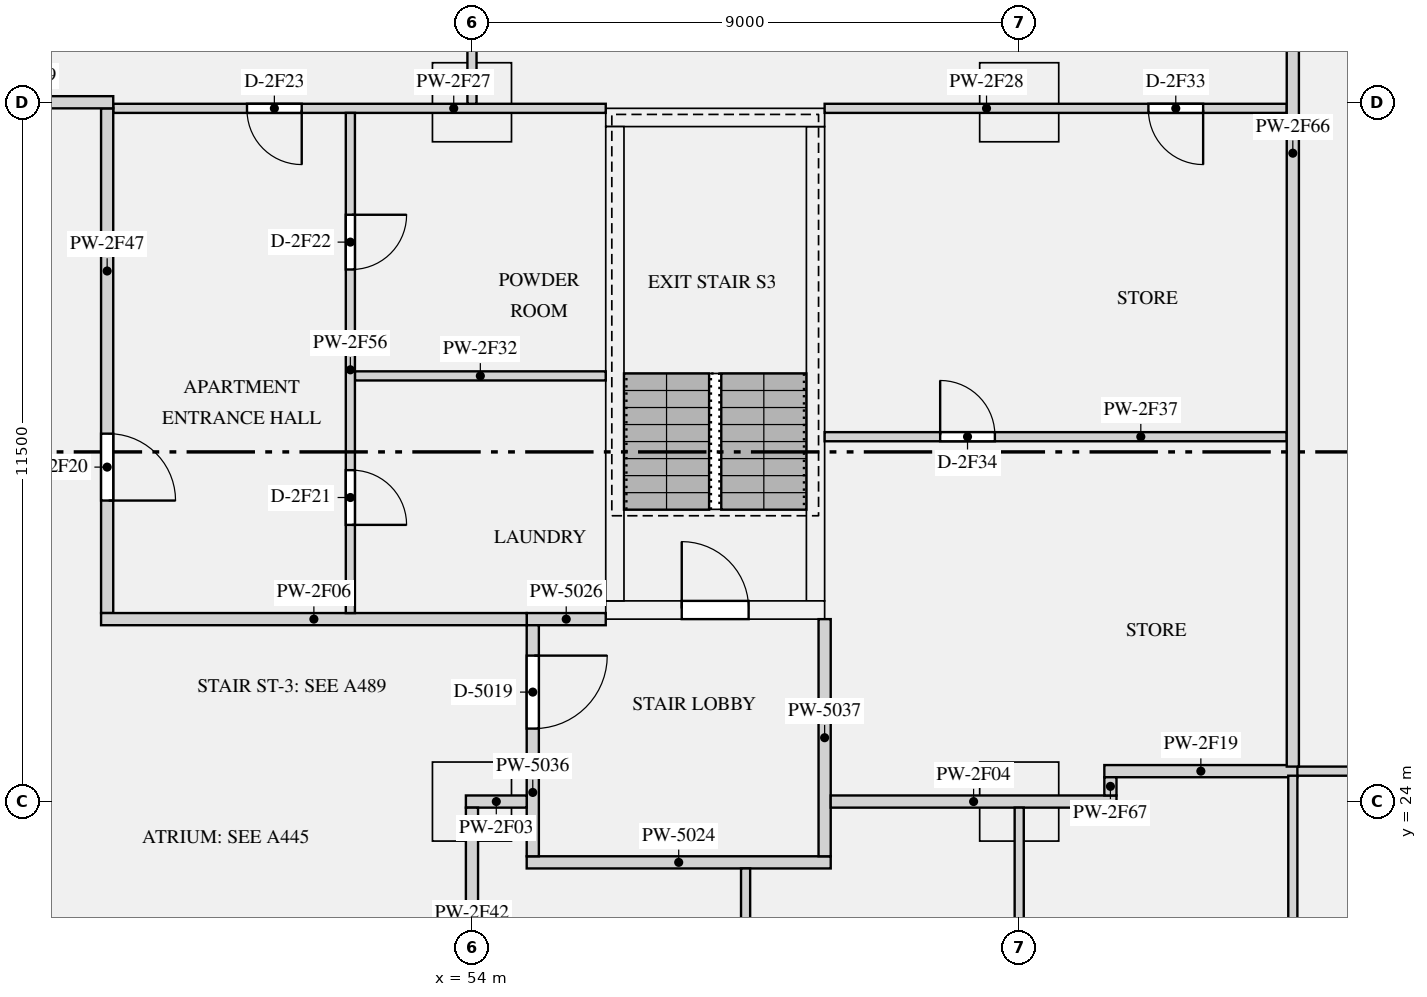
"""IFC4 building model, lengths in metres.
Left out: names, types, materials, properties, quantities, classifications, styles, units other than length and angle.
Written with IfcOpenShell. Run it as: python <this file> out.ifc"""

import sys

from ifc_helpers import new_model, si_unit, direction, frame, frame_2d, origin, origin_2d, place, context, subcontext, project, spatial, rectangle, extrude, element, fill, save


model = new_model("IFC4")
c1 = context("Model", 3, precision=1e-05, world=origin(), true_north=direction((0.0, 1.0)))
c2 = subcontext(c1, "Body", "Model", "MODEL_VIEW")
j1 = project(units=[si_unit("LENGTHUNIT", "METRE"), si_unit("PLANEANGLEUNIT", "RADIAN")], contexts=[c1])
p1 = place(None, origin())
s1 = spatial("IfcSite", under=j1, at=p1, CompositionType="ELEMENT")
p2 = place(p1, origin())
s2 = spatial("IfcBuilding", under=s1, at=p2, CompositionType="ELEMENT")
p3 = place(p2, frame((0.0, 0.0, 124.5)))
s3 = spatial("IfcBuildingStorey", under=s2, at=p3, CompositionType="ELEMENT", Elevation=124.5)
for number, where, z_axis, x_axis in (
    (1, (54.0, 24.0, 0.0), (0.0, 0.0, 1.0), (1.0, 0.0, 0.0)),
    (2, (63.0, 24.0, 0.0), (0.0, 0.0, 1.0), (1.0, 0.0, 0.0)),
    (3, (54.0, 35.5, 0.0), (0.0, 0.0, 1.0), (1.0, 0.0, 0.0)),
    (4, (63.0, 35.5, 0.0), (0.0, 0.0, 1.0), (1.0, 0.0, 0.0)),
):
    element("IfcColumn", number, at=place(p3, frame(where, z_axis=z_axis, x_axis=x_axis)), inside=s3, PredefinedType="COLUMN", context=c2, shape_type="SweptSolid", body=[
        extrude(rectangle(XDim=1.3, YDim=1.3, at=origin_2d()), origin(), (0.0, 0.0, 1.0), 3.15),
    ])
p4 = place(p3, frame((56.2, 27.15, 0.0), z_axis=(0.0, 0.0, 1.0), x_axis=(1.0, 0.0, 0.0)))
e5 = element("IfcWall", 5, at=p4, inside=s3, PredefinedType="SHEAR", context=c2, shape_type="SweptSolid", body=[
    extrude(rectangle(XDim=3.6, YDim=0.3, at=frame_2d((1.8, 0.0))), origin(), (0.0, 0.0, 1.0), 3.15),
])
p5 = place(p4, frame((1.25, 0.0, 0.0)))
e6 = element("IfcOpeningElement", 6, at=p5, cuts=e5, PredefinedType="OPENING", context=c2, shape_type="SweptSolid", body=[
    extrude(rectangle(XDim=1.1, YDim=2.1, at=frame_2d((0.55, 1.05))), frame((0.0, 0.16, 0.0), z_axis=(0.0, -1.0, 0.0), x_axis=(1.0, 0.0, 0.0)), (0.0, 0.0, 1.0), 0.32),
])
p6 = place(p3, frame((56.2, 35.25, 0.0), z_axis=(0.0, 0.0, 1.0), x_axis=(1.0, 0.0, 0.0)))
e7 = element("IfcWall", 7, at=p6, inside=s3, PredefinedType="SHEAR", context=c2, shape_type="SweptSolid", body=[
    extrude(rectangle(XDim=3.6, YDim=0.3, at=frame_2d((1.8, 0.0))), origin(), (0.0, 0.0, 1.0), 3.15),
])
for number, where, z_axis, x_axis in (
    (8, (56.35, 27.3, 0.0), (0.0, 0.0, 1.0), (0.0, 1.0, 0.0)),
    (9, (59.65, 27.3, 0.0), (0.0, 0.0, 1.0), (0.0, 1.0, 0.0)),
):
    element("IfcWall", number, at=place(p3, frame(where, z_axis=z_axis, x_axis=x_axis)), inside=s3, PredefinedType="SHEAR", context=c2, shape_type="SweptSolid", body=[
        extrude(rectangle(XDim=7.8, YDim=0.3, at=frame_2d((3.9, 0.0))), origin(), (0.0, 0.0, 1.0), 3.15),
    ])
p7 = place(p3, frame((54.9, 23.0, 0.0), z_axis=(0.0, 0.0, 1.0), x_axis=(1.0, 0.0, 0.0)))
e10 = element("IfcWall", 10, at=p7, inside=s3, PredefinedType="PARTITIONING", context=c2, shape_type="SweptSolid", body=[
    extrude(rectangle(XDim=5.0, YDim=0.2, at=frame_2d((2.5, 0.0))), origin(), (0.0, 0.0, 1.0), 2.83),
])
p8 = place(p3, frame((54.9, 27.0, 0.0), z_axis=(0.0, 0.0, 1.0), x_axis=(1.0, 0.0, 0.0)))
e11 = element("IfcWall", 11, at=p8, inside=s3, PredefinedType="PARTITIONING", context=c2, shape_type="SweptSolid", body=[
    extrude(rectangle(XDim=1.3, YDim=0.2, at=frame_2d((0.65, 0.0))), origin(), (0.0, 0.0, 1.0), 2.83),
])
p9 = place(p3, frame((55.0, 23.1, 0.0), z_axis=(0.0, 0.0, 1.0), x_axis=(0.0, 1.0, 0.0)))
e12 = element("IfcWall", 12, at=p9, inside=s3, PredefinedType="PARTITIONING", context=c2, shape_type="SweptSolid", body=[
    extrude(rectangle(XDim=3.8, YDim=0.2, at=frame_2d((1.9, 0.0))), origin(), (0.0, 0.0, 1.0), 2.83),
])
p10 = place(p9, frame((2.1, 0.0, 0.0)))
e13 = element("IfcOpeningElement", 13, at=p10, cuts=e12, PredefinedType="OPENING", context=c2, shape_type="SweptSolid", body=[
    extrude(rectangle(XDim=1.2, YDim=2.1, at=frame_2d((0.6, 1.05))), frame((0.0, 0.11, 0.0), z_axis=(0.0, -1.0, 0.0), x_axis=(1.0, 0.0, 0.0)), (0.0, 0.0, 1.0), 0.22),
])
p11 = place(p3, frame((59.8, 23.1, 0.0), z_axis=(0.0, 0.0, 1.0), x_axis=(0.0, 1.0, 0.0)))
e14 = element("IfcWall", 14, at=p11, inside=s3, PredefinedType="PARTITIONING", context=c2, shape_type="SweptSolid", body=[
    extrude(rectangle(XDim=3.9, YDim=0.2, at=frame_2d((1.95, 0.0))), origin(), (0.0, 0.0, 1.0), 2.83),
])
p12 = place(p3, frame((53.9, 24.0, 0.0), z_axis=(0.0, 0.0, 1.0), x_axis=(1.0, 0.0, 0.0)))
e15 = element("IfcWall", 15, at=p12, inside=s3, PredefinedType="PARTITIONING", context=c2, shape_type="SweptSolid", body=[
    extrude(rectangle(XDim=1.0, YDim=0.2, at=frame_2d((0.5, 0.0))), origin(), (0.0, 0.0, 1.0), 2.83),
])
p13 = place(p3, frame((59.9, 24.0, 0.0), z_axis=(0.0, 0.0, 1.0), x_axis=(1.0, 0.0, 0.0)))
e16 = element("IfcWall", 16, at=p13, inside=s3, PredefinedType="PARTITIONING", context=c2, shape_type="SweptSolid", body=[
    extrude(rectangle(XDim=4.7, YDim=0.2, at=frame_2d((2.35, 0.0))), origin(), (0.0, 0.0, 1.0), 2.83),
])
p14 = place(p3, frame((47.9, 27.0, 0.0), z_axis=(0.0, 0.0, 1.0), x_axis=(1.0, 0.0, 0.0)))
e17 = element("IfcWall", 17, at=p14, inside=s3, PredefinedType="PARTITIONING", context=c2, shape_type="SweptSolid", body=[
    extrude(rectangle(XDim=7.0, YDim=0.2, at=frame_2d((3.5, 0.0))), origin(), (0.0, 0.0, 1.0), 2.83),
])
p15 = place(p3, frame((45.0, 35.5, 0.0), z_axis=(0.0, 0.0, 1.0), x_axis=(1.0, 0.0, 0.0)))
e18 = element("IfcWall", 18, at=p15, inside=s3, PredefinedType="PARTITIONING", context=c2, shape_type="SweptSolid", body=[
    extrude(rectangle(XDim=3.1, YDim=0.2, at=frame_2d((1.55, 0.0))), origin(), (0.0, 0.0, 1.0), 2.83),
])
p16 = place(p3, frame((67.425, 24.5, 0.0), z_axis=(0.0, 0.0, 1.0), x_axis=(1.0, 0.0, 0.0)))
e19 = element("IfcWall", 19, at=p16, inside=s3, PredefinedType="PARTITIONING", context=c2, shape_type="SweptSolid", body=[
    extrude(rectangle(XDim=4.65, YDim=0.15, at=frame_2d((2.325, 0.0))), origin(), (0.0, 0.0, 1.0), 2.83),
])
p17 = place(p16, frame((1.25, 0.0, 0.0)))
e20 = element("IfcOpeningElement", 20, at=p17, cuts=e19, PredefinedType="OPENING", context=c2, shape_type="SweptSolid", body=[
    extrude(rectangle(XDim=1.5, YDim=2.1, at=frame_2d((0.75, 1.05))), frame((0.0, 0.085, 0.0), z_axis=(0.0, -1.0, 0.0), x_axis=(1.0, 0.0, 0.0)), (0.0, 0.0, 1.0), 0.17),
])
p18 = place(p3, frame((64.4, 24.5, 0.0), z_axis=(0.0, 0.0, 1.0), x_axis=(1.0, 0.0, 0.0)))
e21 = element("IfcWall", 21, at=p18, inside=s3, PredefinedType="PARTITIONING", context=c2, shape_type="SweptSolid", body=[
    extrude(rectangle(XDim=3.175, YDim=0.2, at=frame_2d((1.587, 0.0))), origin(), (0.0, 0.0, 1.0), 2.83),
])
p19 = place(p3, frame((48.1, 35.4, 0.0), z_axis=(0.0, 0.0, 1.0), x_axis=(1.0, 0.0, 0.0)))
e22 = element("IfcWall", 22, at=p19, inside=s3, PredefinedType="PARTITIONING", context=c2, shape_type="SweptSolid", body=[
    extrude(rectangle(XDim=8.1, YDim=0.15, at=frame_2d((4.05, 0.0))), origin(), (0.0, 0.0, 1.0), 2.83),
])
p20 = place(p19, frame((2.2, 0.0, 0.0)))
e23 = element("IfcOpeningElement", 23, at=p20, cuts=e22, PredefinedType="OPENING", context=c2, shape_type="SweptSolid", body=[
    extrude(rectangle(XDim=0.9, YDim=2.1, at=frame_2d((0.45, 1.05))), frame((0.0, 0.085, 0.0), z_axis=(0.0, -1.0, 0.0), x_axis=(1.0, 0.0, 0.0)), (0.0, 0.0, 1.0), 0.17),
])
p21 = place(p3, frame((59.8, 35.4, 0.0), z_axis=(0.0, 0.0, 1.0), x_axis=(1.0, 0.0, 0.0)))
e24 = element("IfcWall", 24, at=p21, inside=s3, PredefinedType="PARTITIONING", context=c2, shape_type="SweptSolid", body=[
    extrude(rectangle(XDim=7.6, YDim=0.15, at=frame_2d((3.8, 0.0))), origin(), (0.0, 0.0, 1.0), 2.83),
])
p22 = place(p21, frame((5.325, 0.0, 0.0)))
e25 = element("IfcOpeningElement", 25, at=p22, cuts=e24, PredefinedType="OPENING", context=c2, shape_type="SweptSolid", body=[
    extrude(rectangle(XDim=0.9, YDim=2.1, at=frame_2d((0.45, 1.05))), frame((0.0, 0.085, 0.0), z_axis=(0.0, -1.0, 0.0), x_axis=(1.0, 0.0, 0.0)), (0.0, 0.0, 1.0), 0.17),
])
p23 = place(p3, frame((52.075, 31.0, 0.0), z_axis=(0.0, 0.0, 1.0), x_axis=(1.0, 0.0, 0.0)))
e26 = element("IfcWall", 26, at=p23, inside=s3, PredefinedType="PARTITIONING", context=c2, shape_type="SweptSolid", body=[
    extrude(rectangle(XDim=4.125, YDim=0.15, at=frame_2d((2.062, 0.0))), origin(), (0.0, 0.0, 1.0), 2.83),
])
p24 = place(p3, frame((59.8, 30.0, 0.0), z_axis=(0.0, 0.0, 1.0), x_axis=(1.0, 0.0, 0.0)))
e27 = element("IfcWall", 27, at=p24, inside=s3, PredefinedType="PARTITIONING", context=c2, shape_type="SweptSolid", body=[
    extrude(rectangle(XDim=7.6, YDim=0.15, at=frame_2d((3.8, 0.0))), origin(), (0.0, 0.0, 1.0), 2.83),
])
p25 = place(p24, frame((1.9, 0.0, 0.0)))
e28 = element("IfcOpeningElement", 28, at=p25, cuts=e27, PredefinedType="OPENING", context=c2, shape_type="SweptSolid", body=[
    extrude(rectangle(XDim=0.9, YDim=2.1, at=frame_2d((0.45, 1.05))), frame((0.0, 0.085, 0.0), z_axis=(0.0, -1.0, 0.0), x_axis=(1.0, 0.0, 0.0)), (0.0, 0.0, 1.0), 0.17),
])
p26 = place(p3, frame((54.0, 35.475, 0.0), z_axis=(0.0, 0.0, 1.0), x_axis=(0.0, 1.0, 0.0)))
e29 = element("IfcWall", 29, at=p26, inside=s3, PredefinedType="PARTITIONING", context=c2, shape_type="SweptSolid", body=[
    extrude(rectangle(XDim=9.275, YDim=0.15, at=frame_2d((4.637, 0.0))), origin(), (0.0, 0.0, 1.0), 2.83),
])
p27 = place(p26, frame((1.65, 0.0, 0.0)))
e30 = element("IfcOpeningElement", 30, at=p27, cuts=e29, PredefinedType="OPENING", context=c2, shape_type="SweptSolid", body=[
    extrude(rectangle(XDim=0.9, YDim=2.1, at=frame_2d((0.45, 1.05))), frame((0.0, 0.085, 0.0), z_axis=(0.0, -1.0, 0.0), x_axis=(1.0, 0.0, 0.0)), (0.0, 0.0, 1.0), 0.17),
])
p28 = place(p3, frame((54.0, 16.1, 0.0), z_axis=(0.0, 0.0, 1.0), x_axis=(0.0, 1.0, 0.0)))
e31 = element("IfcWall", 31, at=p28, inside=s3, PredefinedType="PARTITIONING", context=c2, shape_type="SweptSolid", body=[
    extrude(rectangle(XDim=7.8, YDim=0.2, at=frame_2d((3.9, 0.0))), origin(), (0.0, 0.0, 1.0), 2.83),
])
p29 = place(p28, frame((2.35, 0.0, 0.0)))
e32 = element("IfcOpeningElement", 32, at=p29, cuts=e31, PredefinedType="OPENING", context=c2, shape_type="SweptSolid", body=[
    extrude(rectangle(XDim=1.1, YDim=2.1, at=frame_2d((0.55, 1.05))), frame((0.0, 0.11, 0.0), z_axis=(0.0, -1.0, 0.0), x_axis=(1.0, 0.0, 0.0)), (0.0, 0.0, 1.0), 0.22),
])
p30 = place(p3, frame((48.0, 27.1, 0.0), z_axis=(0.0, 0.0, 1.0), x_axis=(0.0, 1.0, 0.0)))
e33 = element("IfcWall", 33, at=p30, inside=s3, PredefinedType="PARTITIONING", context=c2, shape_type="SweptSolid", body=[
    extrude(rectangle(XDim=8.3, YDim=0.2, at=frame_2d((4.15, 0.0))), origin(), (0.0, 0.0, 1.0), 2.83),
])
p31 = place(p30, frame((1.85, 0.0, 0.0)))
e34 = element("IfcOpeningElement", 34, at=p31, cuts=e33, PredefinedType="OPENING", context=c2, shape_type="SweptSolid", body=[
    extrude(rectangle(XDim=1.1, YDim=2.1, at=frame_2d((0.55, 1.05))), frame((0.0, 0.11, 0.0), z_axis=(0.0, -1.0, 0.0), x_axis=(1.0, 0.0, 0.0)), (0.0, 0.0, 1.0), 0.22),
])
p32 = place(p3, frame((52.0, 27.1, 0.0), z_axis=(0.0, 0.0, 1.0), x_axis=(0.0, 1.0, 0.0)))
e35 = element("IfcWall", 35, at=p32, inside=s3, PredefinedType="PARTITIONING", context=c2, shape_type="SweptSolid", body=[
    extrude(rectangle(XDim=8.225, YDim=0.15, at=frame_2d((4.112, 0.0))), origin(), (0.0, 0.0, 1.0), 2.83),
])
p33 = place(p32, frame((1.45, 0.0, 0.0)))
e36 = element("IfcOpeningElement", 36, at=p33, cuts=e35, PredefinedType="OPENING", context=c2, shape_type="SweptSolid", body=[
    extrude(rectangle(XDim=0.9, YDim=2.1, at=frame_2d((0.45, 1.05))), frame((0.0, 0.085, 0.0), z_axis=(0.0, -1.0, 0.0), x_axis=(1.0, 0.0, 0.0)), (0.0, 0.0, 1.0), 0.17),
])
p34 = place(p32, frame((5.65, 0.0, 0.0)))
e37 = element("IfcOpeningElement", 37, at=p34, cuts=e35, PredefinedType="OPENING", context=c2, shape_type="SweptSolid", body=[
    extrude(rectangle(XDim=0.9, YDim=2.1, at=frame_2d((0.45, 1.05))), frame((0.0, 0.085, 0.0), z_axis=(0.0, -1.0, 0.0), x_axis=(1.0, 0.0, 0.0)), (0.0, 0.0, 1.0), 0.17),
])
p35 = place(p3, frame((63.0, 12.575, 0.0), z_axis=(0.0, 0.0, 1.0), x_axis=(0.0, 1.0, 0.0)))
e38 = element("IfcWall", 38, at=p35, inside=s3, PredefinedType="PARTITIONING", context=c2, shape_type="SweptSolid", body=[
    extrude(rectangle(XDim=11.325, YDim=0.15, at=frame_2d((5.663, 0.0))), origin(), (0.0, 0.0, 1.0), 2.83),
])
p36 = place(p35, frame((1.8, 0.0, 0.0)))
e39 = element("IfcOpeningElement", 39, at=p36, cuts=e38, PredefinedType="OPENING", context=c2, shape_type="SweptSolid", body=[
    extrude(rectangle(XDim=0.9, YDim=2.1, at=frame_2d((0.45, 1.05))), frame((0.0, 0.085, 0.0), z_axis=(0.0, -1.0, 0.0), x_axis=(1.0, 0.0, 0.0)), (0.0, 0.0, 1.0), 0.17),
])
p37 = place(p35, frame((6.9, 0.0, 0.0)))
e40 = element("IfcOpeningElement", 40, at=p37, cuts=e38, PredefinedType="OPENING", context=c2, shape_type="SweptSolid", body=[
    extrude(rectangle(XDim=0.9, YDim=2.1, at=frame_2d((0.45, 1.05))), frame((0.0, 0.085, 0.0), z_axis=(0.0, -1.0, 0.0), x_axis=(1.0, 0.0, 0.0)), (0.0, 0.0, 1.0), 0.17),
])
p38 = place(p3, frame((67.5, 16.575, 0.0), z_axis=(0.0, 0.0, 1.0), x_axis=(0.0, 1.0, 0.0)))
e41 = element("IfcWall", 41, at=p38, inside=s3, PredefinedType="PARTITIONING", context=c2, shape_type="SweptSolid", body=[
    extrude(rectangle(XDim=7.85, YDim=0.15, at=frame_2d((3.925, 0.0))), origin(), (0.0, 0.0, 1.0), 2.83),
])
p39 = place(p3, frame((67.5, 24.575, 0.0), z_axis=(0.0, 0.0, 1.0), x_axis=(0.0, 1.0, 0.0)))
e42 = element("IfcWall", 42, at=p39, inside=s3, PredefinedType="PARTITIONING", context=c2, shape_type="SweptSolid", body=[
    extrude(rectangle(XDim=20.175, YDim=0.2, at=frame_2d((10.087, 0.0))), origin(), (0.0, 0.0, 1.0), 2.83),
])
p40 = place(p3, frame((64.5, 24.1, 0.0), z_axis=(0.0, 0.0, 1.0), x_axis=(0.0, 1.0, 0.0)))
e43 = element("IfcWall", 43, at=p40, inside=s3, PredefinedType="PARTITIONING", context=c2, shape_type="SweptSolid", body=[
    extrude(rectangle(XDim=0.3, YDim=0.2, at=frame_2d((0.15, 0.0))), origin(), (0.0, 0.0, 1.0), 2.83),
])
p41 = place(p3, frame((58.5, 12.575, 0.0), z_axis=(0.0, 0.0, 1.0), x_axis=(0.0, 1.0, 0.0)))
e44 = element("IfcWall", 44, at=p41, inside=s3, PredefinedType="PARTITIONING", context=c2, shape_type="SweptSolid", body=[
    extrude(rectangle(XDim=10.325, YDim=0.15, at=frame_2d((5.163, 0.0))), origin(), (0.0, 0.0, 1.0), 2.83),
])
p42 = place(p41, frame((4.75, 0.0, 0.0)))
e45 = element("IfcOpeningElement", 45, at=p42, cuts=e44, PredefinedType="OPENING", context=c2, shape_type="SweptSolid", body=[
    extrude(rectangle(XDim=0.9, YDim=2.1, at=frame_2d((0.45, 1.05))), frame((0.0, 0.085, 0.0), z_axis=(0.0, -1.0, 0.0), x_axis=(1.0, 0.0, 0.0)), (0.0, 0.0, 1.0), 0.17),
])
p43 = place(p5, origin())
e46 = element("IfcDoor", 46, at=p43, inside=s3, OperationType="SINGLE_SWING_LEFT", PredefinedType="DOOR", context=c2, shape_type="SweptSolid", body=[
    extrude(rectangle(XDim=1.1, YDim=2.1, at=frame_2d((0.55, 1.05))), frame((0.0, 0.025, 0.0), z_axis=(0.0, -1.0, 0.0), x_axis=(1.0, 0.0, 0.0)), (0.0, 0.0, 1.0), 0.05),
])
fill(e6, e46)
p44 = place(p10, frame((1.2, 0.0, 0.0), z_axis=(0.0, 0.0, 1.0), x_axis=(-1.0, 0.0, 0.0)))
e47 = element("IfcDoor", 47, at=p44, inside=s3, OperationType="SINGLE_SWING_LEFT", PredefinedType="DOOR", context=c2, shape_type="SweptSolid", body=[
    extrude(rectangle(XDim=1.2, YDim=2.1, at=frame_2d((0.6, 1.05))), frame((0.0, 0.025, 0.0), z_axis=(0.0, -1.0, 0.0), x_axis=(1.0, 0.0, 0.0)), (0.0, 0.0, 1.0), 0.05),
])
fill(e13, e47)
p45 = place(p31, frame((1.1, 0.0, 0.0), z_axis=(0.0, 0.0, 1.0), x_axis=(-1.0, 0.0, 0.0)))
e48 = element("IfcDoor", 48, at=p45, inside=s3, OperationType="SINGLE_SWING_RIGHT", PredefinedType="DOOR", context=c2, shape_type="SweptSolid", body=[
    extrude(rectangle(XDim=1.1, YDim=2.1, at=frame_2d((0.55, 1.05))), frame((0.0, 0.025, 0.0), z_axis=(0.0, -1.0, 0.0), x_axis=(1.0, 0.0, 0.0)), (0.0, 0.0, 1.0), 0.05),
])
fill(e34, e48)
p46 = place(p33, frame((0.9, 0.0, 0.0), z_axis=(0.0, 0.0, 1.0), x_axis=(-1.0, 0.0, 0.0)))
e49 = element("IfcDoor", 49, at=p46, inside=s3, OperationType="SINGLE_SWING_RIGHT", PredefinedType="DOOR", context=c2, shape_type="SweptSolid", body=[
    extrude(rectangle(XDim=0.9, YDim=2.1, at=frame_2d((0.45, 1.05))), frame((0.0, 0.025, 0.0), z_axis=(0.0, -1.0, 0.0), x_axis=(1.0, 0.0, 0.0)), (0.0, 0.0, 1.0), 0.05),
])
fill(e36, e49)
p47 = place(p34, frame((0.9, 0.0, 0.0), z_axis=(0.0, 0.0, 1.0), x_axis=(-1.0, 0.0, 0.0)))
e50 = element("IfcDoor", 50, at=p47, inside=s3, OperationType="SINGLE_SWING_LEFT", PredefinedType="DOOR", context=c2, shape_type="SweptSolid", body=[
    extrude(rectangle(XDim=0.9, YDim=2.1, at=frame_2d((0.45, 1.05))), frame((0.0, 0.025, 0.0), z_axis=(0.0, -1.0, 0.0), x_axis=(1.0, 0.0, 0.0)), (0.0, 0.0, 1.0), 0.05),
])
fill(e37, e50)
p48 = place(p20, frame((0.9, 0.0, 0.0), z_axis=(0.0, 0.0, 1.0), x_axis=(-1.0, 0.0, 0.0)))
e51 = element("IfcDoor", 51, at=p48, inside=s3, OperationType="SINGLE_SWING_LEFT", PredefinedType="DOOR", context=c2, shape_type="SweptSolid", body=[
    extrude(rectangle(XDim=0.9, YDim=2.1, at=frame_2d((0.45, 1.05))), frame((0.0, 0.025, 0.0), z_axis=(0.0, -1.0, 0.0), x_axis=(1.0, 0.0, 0.0)), (0.0, 0.0, 1.0), 0.05),
])
fill(e23, e51)
p49 = place(p22, frame((0.9, 0.0, 0.0), z_axis=(0.0, 0.0, 1.0), x_axis=(-1.0, 0.0, 0.0)))
e52 = element("IfcDoor", 52, at=p49, inside=s3, OperationType="SINGLE_SWING_LEFT", PredefinedType="DOOR", context=c2, shape_type="SweptSolid", body=[
    extrude(rectangle(XDim=0.9, YDim=2.1, at=frame_2d((0.45, 1.05))), frame((0.0, 0.025, 0.0), z_axis=(0.0, -1.0, 0.0), x_axis=(1.0, 0.0, 0.0)), (0.0, 0.0, 1.0), 0.05),
])
fill(e25, e52)
p50 = place(p25, origin())
e53 = element("IfcDoor", 53, at=p50, inside=s3, OperationType="SINGLE_SWING_LEFT", PredefinedType="DOOR", context=c2, shape_type="SweptSolid", body=[
    extrude(rectangle(XDim=0.9, YDim=2.1, at=frame_2d((0.45, 1.05))), frame((0.0, 0.025, 0.0), z_axis=(0.0, -1.0, 0.0), x_axis=(1.0, 0.0, 0.0)), (0.0, 0.0, 1.0), 0.05),
])
fill(e28, e53)
save(model, sys.argv[1])
